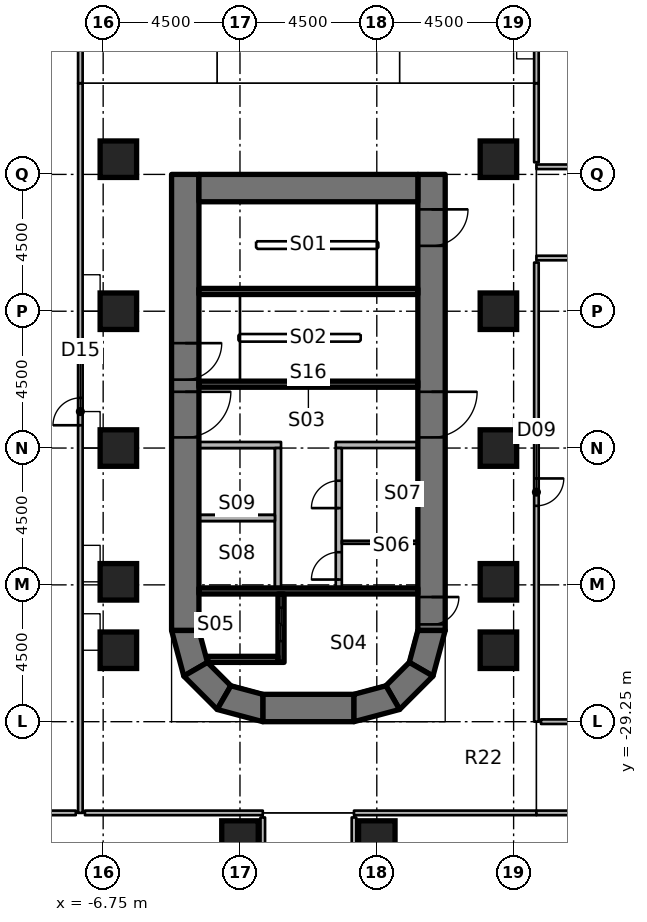
"""IFC4 building model, lengths in metres.
Left out: names, types, materials, properties, quantities, classifications, styles, units other than length and angle.
Written with IfcOpenShell. Run it as: python <this file> out.ifc"""

import sys

from ifc_helpers import new_model, si_unit, direction, frame, frame_2d, origin, origin_2d, place, context, subcontext, project, spatial, polyline, rectangle, outline, extrude, element, fill, save


model = new_model("IFC4")
c1 = context("Model", 3, precision=1e-05, world=origin(), true_north=direction((0.0, 1.0)))
c2 = subcontext(c1, "Body", "Model", "MODEL_VIEW")
j1 = project(units=[si_unit("LENGTHUNIT", "METRE"), si_unit("PLANEANGLEUNIT", "RADIAN")], contexts=[c1])
p1 = place(None, origin())
s1 = spatial("IfcSite", under=j1, at=p1, CompositionType="ELEMENT")
p2 = place(p1, origin())
s2 = spatial("IfcBuilding", under=s1, at=p2, CompositionType="ELEMENT")
p3 = place(p2, frame((0.0, 0.0, 7.0)))
s3 = spatial("IfcBuildingStorey", under=s2, at=p3, CompositionType="ELEMENT", Elevation=7.0)
for number, where, z_axis, x_axis in (
    (1, (-6.25, -26.9, 0.0), (0.0, 0.0, 1.0), (1.0, 0.0, 0.0)),
    (2, (-6.25, -24.65, 0.0), (0.0, 0.0, 1.0), (1.0, 0.0, 0.0)),
    (3, (-6.25, -20.25, 0.0), (0.0, 0.0, 1.0), (1.0, 0.0, 0.0)),
    (4, (-6.25, -15.75, 0.0), (0.0, 0.0, 1.0), (1.0, 0.0, 0.0)),
    (5, (-6.25, -10.75, 0.0), (0.0, 0.0, 1.0), (1.0, 0.0, 0.0)),
    (6, (-2.25, -33.11, 0.0), (0.0, 0.0, 1.0), (1.0, 0.0, 0.0)),
    (7, (2.25, -33.11, 0.0), (0.0, 0.0, 1.0), (1.0, 0.0, 0.0)),
    (8, (6.25, -26.9, 0.0), (0.0, 0.0, 1.0), (1.0, 0.0, 0.0)),
    (9, (6.25, -24.65, 0.0), (0.0, 0.0, 1.0), (1.0, 0.0, 0.0)),
    (10, (6.25, -20.25, 0.0), (0.0, 0.0, 1.0), (1.0, 0.0, 0.0)),
    (11, (6.25, -15.75, 0.0), (0.0, 0.0, 1.0), (1.0, 0.0, 0.0)),
    (12, (6.25, -10.75, 0.0), (0.0, 0.0, 1.0), (1.0, 0.0, 0.0)),
):
    element("IfcColumn", number, at=place(p3, frame(where, z_axis=z_axis, x_axis=x_axis)), inside=s3, PredefinedType="COLUMN", context=c2, shape_type="SweptSolid", body=[
        extrude(rectangle(XDim=1.2, YDim=1.2, at=origin_2d()), origin(), (0.0, 0.0, 1.0), 4.55),
    ])
p4 = place(p3, frame((-4.05, -11.25, 0.0), z_axis=(0.0, 0.0, 1.0), x_axis=(0.0, -1.0, 0.0)))
e13 = element("IfcWall", 13, at=p4, inside=s3, PredefinedType="SHEAR", context=c2, shape_type="SweptSolid", body=[
    extrude(rectangle(XDim=15.0, YDim=0.9, at=frame_2d((7.5, 0.0))), origin(), (0.0, 0.0, 1.0), 5.0),
])
p5 = place(p4, frame((7.15, 0.0, 0.0)))
e14 = element("IfcOpeningElement", 14, at=p5, cuts=e13, PredefinedType="OPENING", context=c2, shape_type="SweptSolid", body=[
    extrude(rectangle(XDim=1.5, YDim=2.3, at=frame_2d((0.75, 1.15))), frame((0.0, 0.46, 0.0), z_axis=(0.0, -1.0, 0.0), x_axis=(1.0, 0.0, 0.0)), (0.0, 0.0, 1.0), 0.92),
])
p6 = place(p4, frame((5.55, 0.0, 0.0)))
e15 = element("IfcOpeningElement", 15, at=p6, cuts=e13, PredefinedType="OPENING", context=c2, shape_type="SweptSolid", body=[
    extrude(rectangle(XDim=1.2, YDim=2.1, at=frame_2d((0.6, 1.05))), frame((0.0, 0.46, 0.0), z_axis=(0.0, -1.0, 0.0), x_axis=(1.0, 0.0, 0.0)), (0.0, 0.0, 1.0), 0.92),
])
p7 = place(p3, frame((4.05, -11.25, 0.0), z_axis=(0.0, 0.0, 1.0), x_axis=(0.0, -1.0, 0.0)))
e16 = element("IfcWall", 16, at=p7, inside=s3, PredefinedType="SHEAR", context=c2, shape_type="SweptSolid", body=[
    extrude(rectangle(XDim=15.0, YDim=0.9, at=frame_2d((7.5, 0.0))), origin(), (0.0, 0.0, 1.0), 5.0),
])
p8 = place(p7, frame((7.15, 0.0, 0.0)))
e17 = element("IfcOpeningElement", 17, at=p8, cuts=e16, PredefinedType="OPENING", context=c2, shape_type="SweptSolid", body=[
    extrude(rectangle(XDim=1.5, YDim=2.3, at=frame_2d((0.75, 1.15))), frame((0.0, 0.46, 0.0), z_axis=(0.0, -1.0, 0.0), x_axis=(1.0, 0.0, 0.0)), (0.0, 0.0, 1.0), 0.92),
])
p9 = place(p7, frame((13.9, 0.0, 0.0)))
e18 = element("IfcOpeningElement", 18, at=p9, cuts=e16, PredefinedType="OPENING", context=c2, shape_type="SweptSolid", body=[
    extrude(rectangle(XDim=0.9, YDim=2.1, at=frame_2d((0.45, 1.05))), frame((0.0, 0.46, 0.0), z_axis=(0.0, -1.0, 0.0), x_axis=(1.0, 0.0, 0.0)), (0.0, 0.0, 1.0), 0.92),
])
p10 = place(p7, frame((1.15, 0.0, 0.0)))
e19 = element("IfcOpeningElement", 19, at=p10, cuts=e16, PredefinedType="OPENING", context=c2, shape_type="SweptSolid", body=[
    extrude(rectangle(XDim=1.2, YDim=2.1, at=frame_2d((0.6, 1.05))), frame((0.0, 0.46, 0.0), z_axis=(0.0, -1.0, 0.0), x_axis=(1.0, 0.0, 0.0)), (0.0, 0.0, 1.0), 0.92),
])
p11 = place(p3, frame((-3.6, -11.7, 0.0), z_axis=(0.0, 0.0, 1.0), x_axis=(1.0, 0.0, 0.0)))
e20 = element("IfcWall", 20, at=p11, inside=s3, PredefinedType="SHEAR", context=c2, shape_type="SweptSolid", body=[
    extrude(rectangle(XDim=7.2, YDim=0.9, at=frame_2d((3.6, 0.0))), origin(), (0.0, 0.0, 1.0), 5.0),
])
p12 = place(p3, frame((-1.5, -28.8, 0.0), z_axis=(0.0, 0.0, 1.0), x_axis=(1.0, 0.0, 0.0)))
e21 = element("IfcWall", 21, at=p12, inside=s3, PredefinedType="SHEAR", context=c2, shape_type="SweptSolid", body=[
    extrude(rectangle(XDim=3.0, YDim=0.9, at=frame_2d((1.5, 0.0))), origin(), (0.0, 0.0, 1.0), 5.0),
])
p13 = place(p3, origin())
e22 = element("IfcWall", 22, at=p13, inside=s3, PredefinedType="SHEAR", context=c2, shape_type="SweptSolid", body=[
    extrude(outline(polyline([(-4.5, -26.25), (-4.098, -27.75), (-3.319, -27.3), (-3.6, -26.25), (-4.5, -26.25)])), origin(), (0.0, 0.0, 1.0), 5.0),
])
p14 = place(p3, origin())
e23 = element("IfcWall", 23, at=p14, inside=s3, PredefinedType="SHEAR", context=c2, shape_type="SweptSolid", body=[
    extrude(outline(polyline([(-4.098, -27.75), (-3.0, -28.848), (-2.55, -28.069), (-3.319, -27.3), (-4.098, -27.75)])), origin(), (0.0, 0.0, 1.0), 5.0),
])
p15 = place(p3, origin())
e24 = element("IfcWall", 24, at=p15, inside=s3, PredefinedType="SHEAR", context=c2, shape_type="SweptSolid", body=[
    extrude(outline(polyline([(-3.0, -28.848), (-1.5, -29.25), (-1.5, -28.35), (-2.55, -28.069), (-3.0, -28.848)])), origin(), (0.0, 0.0, 1.0), 5.0),
])
p16 = place(p3, origin())
e25 = element("IfcWall", 25, at=p16, inside=s3, PredefinedType="SHEAR", context=c2, shape_type="SweptSolid", body=[
    extrude(outline(polyline([(4.5, -26.25), (4.098, -27.75), (3.319, -27.3), (3.6, -26.25), (4.5, -26.25)])), origin(), (0.0, 0.0, 1.0), 5.0),
])
p17 = place(p3, origin())
e26 = element("IfcWall", 26, at=p17, inside=s3, PredefinedType="SHEAR", context=c2, shape_type="SweptSolid", body=[
    extrude(outline(polyline([(4.098, -27.75), (3.0, -28.848), (2.55, -28.069), (3.319, -27.3), (4.098, -27.75)])), origin(), (0.0, 0.0, 1.0), 5.0),
])
p18 = place(p3, origin())
e27 = element("IfcWall", 27, at=p18, inside=s3, PredefinedType="SHEAR", context=c2, shape_type="SweptSolid", body=[
    extrude(outline(polyline([(3.0, -28.848), (1.5, -29.25), (1.5, -28.35), (2.55, -28.069), (3.0, -28.848)])), origin(), (0.0, 0.0, 1.0), 5.0),
])
p19 = place(p3, frame((3.6, -24.95, 0.0), z_axis=(0.0, 0.0, 1.0), x_axis=(-1.0, 0.0, 0.0)))
e28 = element("IfcWall", 28, at=p19, inside=s3, PredefinedType="SHEAR", context=c2, shape_type="SweptSolid", body=[
    extrude(rectangle(XDim=7.2, YDim=0.2, at=frame_2d((3.6, 0.0))), origin(), (0.0, 0.0, 1.0), 4.55),
])
p20 = place(p3, frame((-0.9, -27.3, 0.0), z_axis=(0.0, 0.0, 1.0), x_axis=(0.0, 1.0, 0.0)))
e29 = element("IfcWall", 29, at=p20, inside=s3, PredefinedType="SHEAR", context=c2, shape_type="SweptSolid", body=[
    extrude(rectangle(XDim=2.25, YDim=0.2, at=frame_2d((1.125, 0.0))), origin(), (0.0, 0.0, 1.0), 4.55),
])
p21 = place(p20, frame((0.7, 0.0, 0.0)))
e30 = element("IfcOpeningElement", 30, at=p21, cuts=e29, PredefinedType="OPENING", context=c2, shape_type="SweptSolid", body=[
    extrude(rectangle(XDim=1.1, YDim=2.3, at=frame_2d((0.55, 1.15))), frame((0.0, 0.11, 0.0), z_axis=(0.0, -1.0, 0.0), x_axis=(1.0, 0.0, 0.0)), (0.0, 0.0, 1.0), 0.22),
])
p22 = place(p3, origin())
e31 = element("IfcWall", 31, at=p22, inside=s3, PredefinedType="SHEAR", context=c2, shape_type="SweptSolid", body=[
    extrude(outline(polyline([(-1.0, -27.1), (-3.341, -27.1), (-3.291, -27.284), (-3.275, -27.3), (-1.0, -27.3), (-1.0, -27.1)])), origin(), (0.0, 0.0, 1.0), 4.55),
])
for number, where, z_axis, x_axis in (
    (32, (3.6, -18.15, 0.0), (0.0, 0.0, 1.0), (-1.0, 0.0, 0.0)),
    (33, (3.6, -15.1, 0.0), (0.0, 0.0, 1.0), (-1.0, 0.0, 0.0)),
):
    element("IfcWall", number, at=place(p3, frame(where, z_axis=z_axis, x_axis=x_axis)), inside=s3, PredefinedType="SHEAR", context=c2, shape_type="SweptSolid", body=[
        extrude(rectangle(XDim=7.2, YDim=0.2, at=frame_2d((3.6, 0.0))), origin(), (0.0, 0.0, 1.0), 4.55),
    ])
p23 = place(p3, frame((3.6, -20.15, 0.0), z_axis=(0.0, 0.0, 1.0), x_axis=(-1.0, 0.0, 0.0)))
e34 = element("IfcWall", 34, at=p23, inside=s3, PredefinedType="PARTITIONING", context=c2, shape_type="SweptSolid", body=[
    extrude(rectangle(XDim=2.7, YDim=0.2, at=frame_2d((1.35, 0.0))), origin(), (0.0, 0.0, 1.0), 4.55),
])
p24 = place(p3, frame((1.0, -24.85, 0.0), z_axis=(0.0, 0.0, 1.0), x_axis=(0.0, 1.0, 0.0)))
e35 = element("IfcWall", 35, at=p24, inside=s3, PredefinedType="PARTITIONING", context=c2, shape_type="SweptSolid", body=[
    extrude(rectangle(XDim=4.6, YDim=0.2, at=frame_2d((2.3, 0.0))), origin(), (0.0, 0.0, 1.0), 4.55),
])
p25 = place(p24, frame((0.275, 0.0, 0.0)))
e36 = element("IfcOpeningElement", 36, at=p25, cuts=e35, PredefinedType="OPENING", context=c2, shape_type="SweptSolid", body=[
    extrude(rectangle(XDim=0.9, YDim=2.1, at=frame_2d((0.45, 1.05))), frame((0.0, 0.11, 0.0), z_axis=(0.0, -1.0, 0.0), x_axis=(1.0, 0.0, 0.0)), (0.0, 0.0, 1.0), 0.22),
])
p26 = place(p24, frame((2.625, 0.0, 0.0)))
e37 = element("IfcOpeningElement", 37, at=p26, cuts=e35, PredefinedType="OPENING", context=c2, shape_type="SweptSolid", body=[
    extrude(rectangle(XDim=0.9, YDim=2.1, at=frame_2d((0.45, 1.05))), frame((0.0, 0.11, 0.0), z_axis=(0.0, -1.0, 0.0), x_axis=(1.0, 0.0, 0.0)), (0.0, 0.0, 1.0), 0.22),
])
p27 = place(p3, frame((-0.9, -20.15, 0.0), z_axis=(0.0, 0.0, 1.0), x_axis=(-1.0, 0.0, 0.0)))
e38 = element("IfcWall", 38, at=p27, inside=s3, PredefinedType="PARTITIONING", context=c2, shape_type="SweptSolid", body=[
    extrude(rectangle(XDim=2.7, YDim=0.2, at=frame_2d((1.35, 0.0))), origin(), (0.0, 0.0, 1.0), 4.55),
])
p28 = place(p3, frame((-1.0, -24.85, 0.0), z_axis=(0.0, 0.0, 1.0), x_axis=(0.0, 1.0, 0.0)))
e39 = element("IfcWall", 39, at=p28, inside=s3, PredefinedType="PARTITIONING", context=c2, shape_type="SweptSolid", body=[
    extrude(rectangle(XDim=4.6, YDim=0.2, at=frame_2d((2.3, 0.0))), origin(), (0.0, 0.0, 1.0), 4.55),
])
p29 = place(p3, frame((3.6, -23.35, 0.0), z_axis=(0.0, 0.0, 1.0), x_axis=(-1.0, 0.0, 0.0)))
e40 = element("IfcWall", 40, at=p29, inside=s3, PredefinedType="PARTITIONING", context=c2, shape_type="SweptSolid", body=[
    extrude(rectangle(XDim=2.5, YDim=0.1, at=frame_2d((1.25, 0.0))), origin(), (0.0, 0.0, 1.0), 4.55),
])
p30 = place(p3, frame((-1.1, -22.55, 0.0), z_axis=(0.0, 0.0, 1.0), x_axis=(-1.0, 0.0, 0.0)))
e41 = element("IfcWall", 41, at=p30, inside=s3, PredefinedType="PARTITIONING", context=c2, shape_type="SweptSolid", body=[
    extrude(rectangle(XDim=2.5, YDim=0.2, at=frame_2d((1.25, 0.0))), origin(), (0.0, 0.0, 1.0), 4.55),
])
p31 = place(p3, frame((7.5, -11.0, 0.0), z_axis=(0.0, 0.0, 1.0), x_axis=(1.0, 0.0, 0.0)))
e42 = element("IfcWall", 42, at=p31, inside=s3, PredefinedType="PARTITIONING", context=c2, shape_type="SweptSolid", body=[
    extrude(rectangle(XDim=2.25, YDim=0.15, at=frame_2d((1.125, 0.0))), origin(), (0.0, 0.0, 1.0), 4.55),
])
p32 = place(p3, frame((16.5, -14.0, 0.0), z_axis=(0.0, 0.0, 1.0), x_axis=(-1.0, 0.0, 0.0)))
e43 = element("IfcWall", 43, at=p32, inside=s3, PredefinedType="PARTITIONING", context=c2, shape_type="SweptSolid", body=[
    extrude(rectangle(XDim=9.0, YDim=0.15, at=frame_2d((4.5, 0.0))), origin(), (0.0, 0.0, 1.0), 4.55),
])
p33 = place(p3, frame((7.5, -10.85, 0.0), z_axis=(0.0, 0.0, 1.0), x_axis=(0.0, 1.0, 0.0)))
e44 = element("IfcWall", 44, at=p33, inside=s3, PredefinedType="PARTITIONING", context=c2, shape_type="SweptSolid", body=[
    extrude(rectangle(XDim=2.6, YDim=0.15, at=frame_2d((1.3, 0.0))), origin(), (0.0, 0.0, 1.0), 4.55),
])
p34 = place(p3, frame((7.5, -1.65, 0.0), z_axis=(0.0, 0.0, 1.0), x_axis=(0.0, -1.0, 0.0)))
e45 = element("IfcWall", 45, at=p34, inside=s3, PredefinedType="PARTITIONING", context=c2, shape_type="SweptSolid", body=[
    extrude(rectangle(XDim=6.6, YDim=0.15, at=frame_2d((3.3, 0.0))), origin(), (0.0, 0.0, 1.0), 4.55),
])
p35 = place(p34, frame((2.85, 0.0, 0.0)))
e46 = element("IfcOpeningElement", 46, at=p35, cuts=e45, PredefinedType="OPENING", context=c2, shape_type="SweptSolid", body=[
    extrude(rectangle(XDim=0.9, YDim=2.1, at=frame_2d((0.45, 1.05))), frame((0.0, 0.085, 0.0), z_axis=(0.0, -1.0, 0.0), x_axis=(1.0, 0.0, 0.0)), (0.0, 0.0, 1.0), 0.17),
])
p36 = place(p3, frame((7.5, -14.15, 0.0), z_axis=(0.0, 0.0, 1.0), x_axis=(0.0, -1.0, 0.0)))
e47 = element("IfcWall", 47, at=p36, inside=s3, PredefinedType="PARTITIONING", context=c2, shape_type="SweptSolid", body=[
    extrude(rectangle(XDim=15.1, YDim=0.15, at=frame_2d((7.55, 0.0))), origin(), (0.0, 0.0, 1.0), 4.55),
])
p37 = place(p36, frame((7.1, 0.0, 0.0)))
e48 = element("IfcOpeningElement", 48, at=p37, cuts=e47, PredefinedType="OPENING", context=c2, shape_type="SweptSolid", body=[
    extrude(rectangle(XDim=0.9, YDim=2.1, at=frame_2d((0.45, 1.05))), frame((0.0, 0.085, 0.0), z_axis=(0.0, -1.0, 0.0), x_axis=(1.0, 0.0, 0.0)), (0.0, 0.0, 1.0), 0.17),
])
p38 = place(p3, frame((16.35, -29.25, 0.0), z_axis=(0.0, 0.0, 1.0), x_axis=(-1.0, 0.0, 0.0)))
e49 = element("IfcWall", 49, at=p38, inside=s3, PredefinedType="PARTITIONING", context=c2, shape_type="SweptSolid", body=[
    extrude(rectangle(XDim=8.7, YDim=0.15, at=frame_2d((4.35, 0.0))), origin(), (0.0, 0.0, 1.0), 4.55),
])
p39 = place(p3, frame((7.5, -32.25, 0.0), z_axis=(0.0, 0.0, 1.0), x_axis=(-1.0, 0.0, 0.0)))
e50 = element("IfcWall", 50, at=p39, inside=s3, PredefinedType="PARTITIONING", context=c2, shape_type="SweptSolid", body=[
    extrude(rectangle(XDim=6.0, YDim=0.15, at=frame_2d((3.0, 0.0))), origin(), (0.0, 0.0, 1.0), 4.55),
])
p40 = place(p3, frame((-7.5, -32.25, 0.0), z_axis=(0.0, 0.0, 1.0), x_axis=(0.0, 1.0, 0.0)))
e51 = element("IfcWall", 51, at=p40, inside=s3, PredefinedType="PARTITIONING", context=c2, shape_type="SweptSolid", body=[
    extrude(rectangle(XDim=24.0, YDim=0.15, at=frame_2d((12.0, 0.0))), origin(), (0.0, 0.0, 1.0), 4.55),
])
p41 = place(p40, frame((12.75, 0.0, 0.0)))
e52 = element("IfcOpeningElement", 52, at=p41, cuts=e51, PredefinedType="OPENING", context=c2, shape_type="SweptSolid", body=[
    extrude(rectangle(XDim=0.9, YDim=2.1, at=frame_2d((0.45, 1.05))), frame((0.0, 0.085, 0.0), z_axis=(0.0, -1.0, 0.0), x_axis=(1.0, 0.0, 0.0)), (0.0, 0.0, 1.0), 0.17),
])
p42 = place(p3, frame((-1.5, -32.25, 0.0), z_axis=(0.0, 0.0, 1.0), x_axis=(-1.0, 0.0, 0.0)))
e53 = element("IfcWall", 53, at=p42, inside=s3, PredefinedType="PARTITIONING", context=c2, shape_type="SweptSolid", body=[
    extrude(rectangle(XDim=5.85, YDim=0.15, at=frame_2d((2.925, 0.0))), origin(), (0.0, 0.0, 1.0), 4.55),
])
for number, where, z_axis, x_axis in (
    (54, (1.5, -32.4, 0.0), (0.0, 0.0, 1.0), (0.0, -1.0, 0.0)),
    (55, (-1.5, -38.1, 0.0), (0.0, 0.0, 1.0), (0.0, 1.0, 0.0)),
):
    element("IfcWall", number, at=place(p3, frame(where, z_axis=z_axis, x_axis=x_axis)), inside=s3, PredefinedType="PARTITIONING", context=c2, shape_type="SweptSolid", body=[
        extrude(rectangle(XDim=5.7, YDim=0.15, at=frame_2d((2.85, 0.0))), origin(), (0.0, 0.0, 1.0), 4.55),
    ])
p43 = place(p3, frame((24.15, -32.25, 0.0), z_axis=(0.0, 0.0, 1.0), x_axis=(-1.0, 0.0, 0.0)))
e56 = element("IfcWall", 56, at=p43, inside=s3, PredefinedType="PARTITIONING", context=c2, shape_type="SweptSolid", body=[
    extrude(rectangle(XDim=16.65, YDim=0.15, at=frame_2d((8.325, 0.0))), origin(), (0.0, 0.0, 1.0), 4.55),
])
p44 = place(p43, frame((7.575, 0.0, 0.0)))
e57 = element("IfcOpeningElement", 57, at=p44, cuts=e56, PredefinedType="OPENING", context=c2, shape_type="SweptSolid", body=[
    extrude(rectangle(XDim=0.9, YDim=2.1, at=frame_2d((0.45, 1.05))), frame((0.0, 0.085, 0.0), z_axis=(0.0, -1.0, 0.0), x_axis=(1.0, 0.0, 0.0)), (0.0, 0.0, 1.0), 0.17),
])
p45 = place(p3, frame((-7.65, -32.25, 0.0), z_axis=(0.0, 0.0, 1.0), x_axis=(-1.0, 0.0, 0.0)))
e58 = element("IfcWall", 58, at=p45, inside=s3, PredefinedType="PARTITIONING", context=c2, shape_type="SweptSolid", body=[
    extrude(rectangle(XDim=16.5, YDim=0.15, at=frame_2d((8.25, 0.0))), origin(), (0.0, 0.0, 1.0), 4.55),
])
p46 = place(p3, frame((-7.5, -1.65, 0.0), z_axis=(0.0, 0.0, 1.0), x_axis=(0.0, -1.0, 0.0)))
e59 = element("IfcWall", 59, at=p46, inside=s3, PredefinedType="PARTITIONING", context=c2, shape_type="SweptSolid", body=[
    extrude(rectangle(XDim=6.6, YDim=0.15, at=frame_2d((3.3, 0.0))), origin(), (0.0, 0.0, 1.0), 4.55),
])
p47 = place(p8, origin())
e60 = element("IfcDoor", 60, at=p47, inside=s3, OperationType="DOUBLE_DOOR_SINGLE_SWING", PredefinedType="DOOR", context=c2, shape_type="SweptSolid", body=[
    extrude(rectangle(XDim=1.5, YDim=2.3, at=frame_2d((0.75, 1.15))), frame((0.0, 0.025, 0.0), z_axis=(0.0, -1.0, 0.0), x_axis=(1.0, 0.0, 0.0)), (0.0, 0.0, 1.0), 0.05),
])
fill(e17, e60)
p48 = place(p5, origin())
e61 = element("IfcDoor", 61, at=p48, inside=s3, OperationType="DOUBLE_DOOR_SINGLE_SWING", PredefinedType="DOOR", context=c2, shape_type="SweptSolid", body=[
    extrude(rectangle(XDim=1.5, YDim=2.3, at=frame_2d((0.75, 1.15))), frame((0.0, 0.025, 0.0), z_axis=(0.0, -1.0, 0.0), x_axis=(1.0, 0.0, 0.0)), (0.0, 0.0, 1.0), 0.05),
])
fill(e14, e61)
p49 = place(p9, origin())
e62 = element("IfcDoor", 62, at=p49, inside=s3, OperationType="SINGLE_SWING_LEFT", PredefinedType="DOOR", context=c2, shape_type="SweptSolid", body=[
    extrude(rectangle(XDim=0.9, YDim=2.1, at=frame_2d((0.45, 1.05))), frame((0.0, 0.025, 0.0), z_axis=(0.0, -1.0, 0.0), x_axis=(1.0, 0.0, 0.0)), (0.0, 0.0, 1.0), 0.05),
])
fill(e18, e62)
p50 = place(p6, origin())
e63 = element("IfcDoor", 63, at=p50, inside=s3, OperationType="SINGLE_SWING_RIGHT", PredefinedType="DOOR", context=c2, shape_type="SweptSolid", body=[
    extrude(rectangle(XDim=1.2, YDim=2.1, at=frame_2d((0.6, 1.05))), frame((0.0, 0.025, 0.0), z_axis=(0.0, -1.0, 0.0), x_axis=(1.0, 0.0, 0.0)), (0.0, 0.0, 1.0), 0.05),
])
fill(e15, e63)
p51 = place(p10, origin())
e64 = element("IfcDoor", 64, at=p51, inside=s3, OperationType="SINGLE_SWING_RIGHT", PredefinedType="DOOR", context=c2, shape_type="SweptSolid", body=[
    extrude(rectangle(XDim=1.2, YDim=2.1, at=frame_2d((0.6, 1.05))), frame((0.0, 0.025, 0.0), z_axis=(0.0, -1.0, 0.0), x_axis=(1.0, 0.0, 0.0)), (0.0, 0.0, 1.0), 0.05),
])
fill(e19, e64)
p52 = place(p21, origin())
e65 = element("IfcDoor", 65, at=p52, inside=s3, OperationType="DOUBLE_DOOR_SLIDING", PredefinedType="DOOR", context=c2, shape_type="SweptSolid", body=[
    extrude(rectangle(XDim=1.1, YDim=2.3, at=frame_2d((0.55, 1.15))), frame((0.0, 0.025, 0.0), z_axis=(0.0, -1.0, 0.0), x_axis=(1.0, 0.0, 0.0)), (0.0, 0.0, 1.0), 0.05),
])
fill(e30, e65)
p53 = place(p25, origin())
e66 = element("IfcDoor", 66, at=p53, inside=s3, OperationType="SINGLE_SWING_RIGHT", PredefinedType="DOOR", context=c2, shape_type="SweptSolid", body=[
    extrude(rectangle(XDim=0.9, YDim=2.1, at=frame_2d((0.45, 1.05))), frame((0.0, 0.025, 0.0), z_axis=(0.0, -1.0, 0.0), x_axis=(1.0, 0.0, 0.0)), (0.0, 0.0, 1.0), 0.05),
])
fill(e36, e66)
p54 = place(p26, origin())
e67 = element("IfcDoor", 67, at=p54, inside=s3, OperationType="SINGLE_SWING_LEFT", PredefinedType="DOOR", context=c2, shape_type="SweptSolid", body=[
    extrude(rectangle(XDim=0.9, YDim=2.1, at=frame_2d((0.45, 1.05))), frame((0.0, 0.025, 0.0), z_axis=(0.0, -1.0, 0.0), x_axis=(1.0, 0.0, 0.0)), (0.0, 0.0, 1.0), 0.05),
])
fill(e37, e67)
p55 = place(p37, origin())
e68 = element("IfcDoor", 68, at=p55, inside=s3, OperationType="SINGLE_SWING_LEFT", PredefinedType="DOOR", context=c2, shape_type="SweptSolid", body=[
    extrude(rectangle(XDim=0.9, YDim=2.1, at=frame_2d((0.45, 1.05))), frame((0.0, 0.025, 0.0), z_axis=(0.0, -1.0, 0.0), x_axis=(1.0, 0.0, 0.0)), (0.0, 0.0, 1.0), 0.05),
])
fill(e48, e68)
p56 = place(p41, origin())
e69 = element("IfcDoor", 69, at=p56, inside=s3, OperationType="SINGLE_SWING_LEFT", PredefinedType="DOOR", context=c2, shape_type="SweptSolid", body=[
    extrude(rectangle(XDim=0.9, YDim=2.1, at=frame_2d((0.45, 1.05))), frame((0.0, 0.025, 0.0), z_axis=(0.0, -1.0, 0.0), x_axis=(1.0, 0.0, 0.0)), (0.0, 0.0, 1.0), 0.05),
])
fill(e52, e69)
save(model, sys.argv[1])
